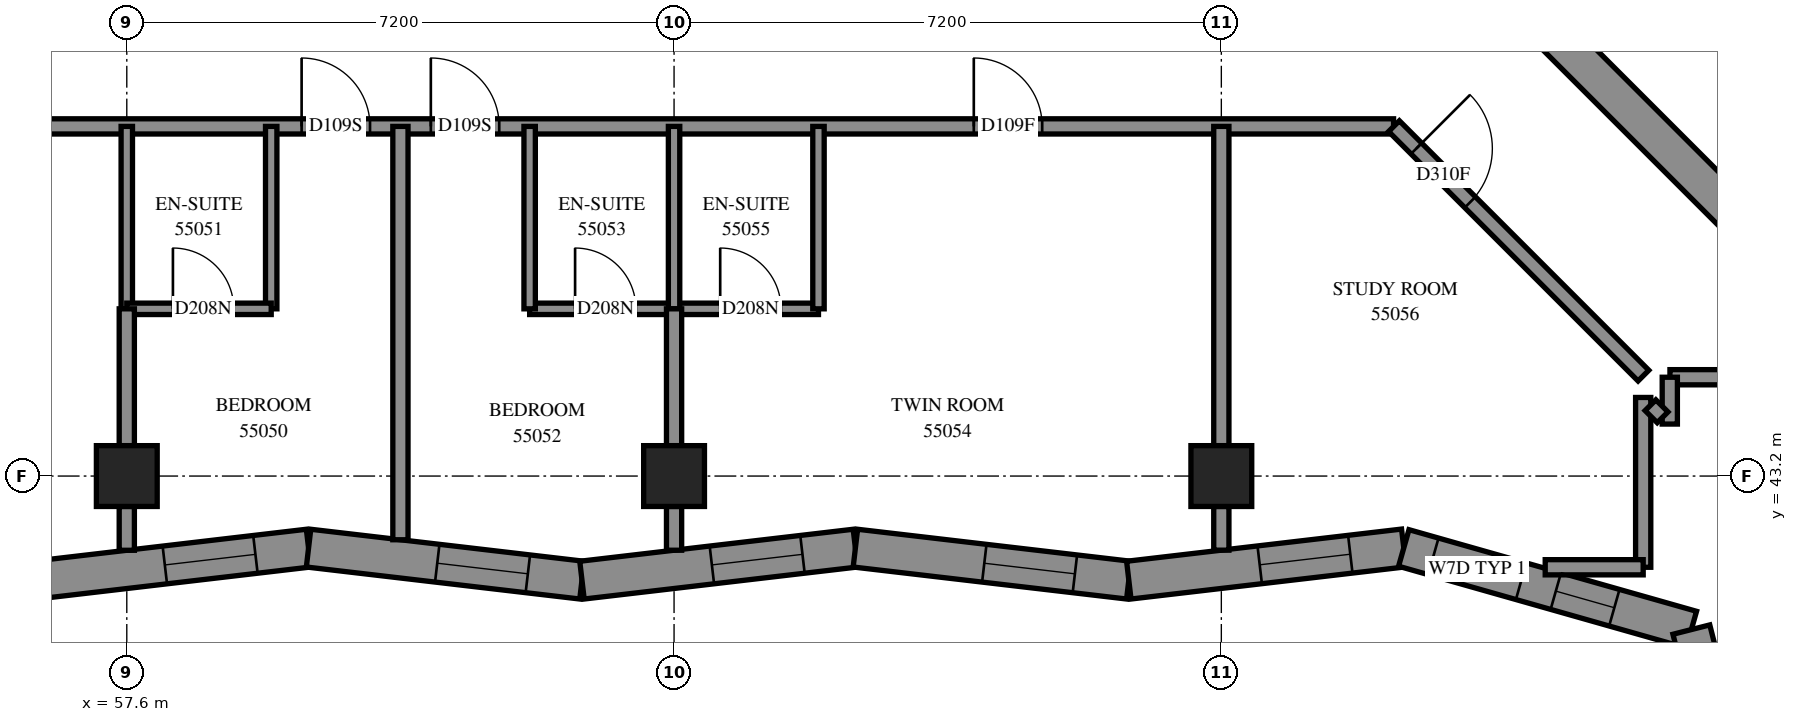
"""IFC4 building model, lengths in metres.
Left out: names, types, materials, properties, quantities, classifications, styles, units other than length and angle.
Written with IfcOpenShell. Run it as: python <this file> out.ifc"""

import sys

from ifc_helpers import new_model, si_unit, direction, frame, frame_2d, origin, origin_2d, place, context, subcontext, project, spatial, polyline, rectangle, outline, extrude, element, fill, save


model = new_model("IFC4")
c1 = context("Model", 3, precision=1e-05, world=origin(), true_north=direction((0.0, 1.0)))
c2 = subcontext(c1, "Body", "Model", "MODEL_VIEW")
j1 = project(units=[si_unit("LENGTHUNIT", "METRE"), si_unit("PLANEANGLEUNIT", "RADIAN")], contexts=[c1])
p1 = place(None, origin())
s1 = spatial("IfcSite", under=j1, at=p1, CompositionType="ELEMENT")
p2 = place(p1, origin())
s2 = spatial("IfcBuilding", under=s1, at=p2, CompositionType="ELEMENT")
p3 = place(p2, frame((0.0, 0.0, 203.2)))
s3 = spatial("IfcBuildingStorey", under=s2, at=p3, CompositionType="ELEMENT", Elevation=203.2)
for number, where, z_axis, x_axis in (
    (1, (57.6, 43.2, 0.0), (0.0, 0.0, 1.0), (1.0, 0.0, 0.0)),
    (2, (64.8, 43.2, 0.0), (0.0, 0.0, 1.0), (1.0, 0.0, 0.0)),
    (3, (72.0, 43.2, 0.0), (0.0, 0.0, 1.0), (1.0, 0.0, 0.0)),
):
    element("IfcColumn", number, at=place(p3, frame(where, z_axis=z_axis, x_axis=x_axis)), inside=s3, PredefinedType="COLUMN", context=c2, shape_type="SweptSolid", body=[
        extrude(rectangle(XDim=0.8, YDim=0.8, at=origin_2d()), origin(), (0.0, 0.0, 1.0), 3.1),
    ])
p4 = place(p3, frame((76.124, 49.267, -0.3), z_axis=(0.0, 0.0, 1.0), x_axis=(0.7071067812, -0.7071067812, 0.0)))
e4 = element("IfcWall", 4, at=p4, inside=s3, PredefinedType="SHEAR", context=c2, shape_type="SweptSolid", body=[
    extrude(rectangle(XDim=15.4, YDim=0.5, at=frame_2d((7.7, 0.0))), origin(), (0.0, 0.0, 1.0), 2.7),
])
p5 = place(p3, frame((56.394, 41.831, 0.0), z_axis=(0.0, 0.0, 1.0), x_axis=(0.9932205385, 0.1162452661, 0.0)))
e5 = element("IfcWall", 5, at=p5, inside=s3, PredefinedType="SOLIDWALL", context=c2, shape_type="SweptSolid", body=[
    extrude(outline(polyline([(-0.029, -0.25), (3.592, -0.25), (3.651, 0.25), (0.029, 0.25), (-0.029, -0.25)])), origin(), (0.0, 0.0, 1.0), 3.1),
])
p6 = place(p5, frame((1.718, 0.0, 0.45)))
e6 = element("IfcOpeningElement", 6, at=p6, cuts=e5, PredefinedType="OPENING", context=c2, shape_type="SweptSolid", body=[
    extrude(rectangle(XDim=1.2, YDim=2.5, at=frame_2d((0.6, 1.25))), frame((0.0, 0.26, 0.0), z_axis=(0.0, -1.0, 0.0), x_axis=(1.0, 0.0, 0.0)), (0.0, 0.0, 1.0), 0.52),
])
p7 = place(p3, frame((59.991, 42.252, 0.0), z_axis=(0.0, 0.0, 1.0), x_axis=(0.9932209116, -0.1162420782, 0.0)))
e7 = element("IfcWall", 7, at=p7, inside=s3, PredefinedType="SOLIDWALL", context=c2, shape_type="SweptSolid", body=[
    extrude(outline(polyline([(0.029, -0.25), (3.651, -0.25), (3.592, 0.25), (-0.029, 0.25), (0.029, -0.25)])), origin(), (0.0, 0.0, 1.0), 3.1),
])
p8 = place(p7, frame((1.705, 0.0, 0.45)))
e8 = element("IfcOpeningElement", 8, at=p8, cuts=e7, PredefinedType="OPENING", context=c2, shape_type="SweptSolid", body=[
    extrude(rectangle(XDim=1.2, YDim=2.5, at=frame_2d((0.6, 1.25))), frame((0.0, 0.26, 0.0), z_axis=(0.0, -1.0, 0.0), x_axis=(1.0, 0.0, 0.0)), (0.0, 0.0, 1.0), 0.52),
])
p9 = place(p3, frame((63.589, 41.831, 0.0), z_axis=(0.0, 0.0, 1.0), x_axis=(0.9932205385, 0.1162452661, 0.0)))
e9 = element("IfcWall", 9, at=p9, inside=s3, PredefinedType="SOLIDWALL", context=c2, shape_type="SweptSolid", body=[
    extrude(outline(polyline([(-0.029, -0.25), (3.592, -0.25), (3.651, 0.25), (0.029, 0.25), (-0.029, -0.25)])), origin(), (0.0, 0.0, 1.0), 3.1),
])
p10 = place(p9, frame((1.721, 0.0, 0.45)))
e10 = element("IfcOpeningElement", 10, at=p10, cuts=e9, PredefinedType="OPENING", context=c2, shape_type="SweptSolid", body=[
    extrude(rectangle(XDim=1.2, YDim=2.5, at=frame_2d((0.6, 1.25))), frame((0.0, 0.26, 0.0), z_axis=(0.0, -1.0, 0.0), x_axis=(1.0, 0.0, 0.0)), (0.0, 0.0, 1.0), 0.52),
])
p11 = place(p3, frame((67.186, 42.252, 0.0), z_axis=(0.0, 0.0, 1.0), x_axis=(0.9932205385, -0.1162452661, 0.0)))
e11 = element("IfcWall", 11, at=p11, inside=s3, PredefinedType="SOLIDWALL", context=c2, shape_type="SweptSolid", body=[
    extrude(outline(polyline([(0.029, -0.25), (3.651, -0.25), (3.592, 0.25), (-0.029, 0.25), (0.029, -0.25)])), origin(), (0.0, 0.0, 1.0), 3.1),
])
p12 = place(p11, frame((1.708, 0.0, 0.45)))
e12 = element("IfcOpeningElement", 12, at=p12, cuts=e11, PredefinedType="OPENING", context=c2, shape_type="SweptSolid", body=[
    extrude(rectangle(XDim=1.2, YDim=2.5, at=frame_2d((0.6, 1.25))), frame((0.0, 0.26, 0.0), z_axis=(0.0, -1.0, 0.0), x_axis=(1.0, 0.0, 0.0)), (0.0, 0.0, 1.0), 0.52),
])
p13 = place(p3, frame((70.783, 41.831, 0.0), z_axis=(0.0, 0.0, 1.0), x_axis=(0.9932201451, 0.1162486273, 0.0)))
e13 = element("IfcWall", 13, at=p13, inside=s3, PredefinedType="SOLIDWALL", context=c2, shape_type="SweptSolid", body=[
    extrude(outline(polyline([(-0.029, -0.25), (3.592, -0.25), (3.692, 0.25), (0.029, 0.25), (-0.029, -0.25)])), origin(), (0.0, 0.0, 1.0), 3.1),
])
p14 = place(p13, frame((1.734, 0.0, 0.45)))
e14 = element("IfcOpeningElement", 14, at=p14, cuts=e13, PredefinedType="OPENING", context=c2, shape_type="SweptSolid", body=[
    extrude(rectangle(XDim=1.2, YDim=2.5, at=frame_2d((0.6, 1.25))), frame((0.0, 0.26, 0.0), z_axis=(0.0, -1.0, 0.0), x_axis=(1.0, 0.0, 0.0)), (0.0, 0.0, 1.0), 0.52),
])
p15 = place(p3, frame((74.4, 42.254, 0.0), z_axis=(0.0, 0.0, 1.0), x_axis=(0.9620012555, -0.2730450228, 0.0)))
e15 = element("IfcWall", 15, at=p15, inside=s3, PredefinedType="SOLIDWALL", context=c2, shape_type="SweptSolid", body=[
    extrude(outline(polyline([(0.05, -0.25), (3.789, -0.25), (4.077, 0.25), (-0.05, 0.25), (0.05, -0.25)])), origin(), (0.0, 0.0, 1.0), 3.1),
])
p16 = place(p15, frame((0.405, 0.0, 0.5)))
e16 = element("IfcOpeningElement", 16, at=p16, cuts=e15, PredefinedType="OPENING", context=c2, shape_type="SweptSolid", body=[
    extrude(rectangle(XDim=1.2, YDim=2.45, at=frame_2d((0.6, 1.225))), frame((0.0, 0.26, 0.0), z_axis=(0.0, -1.0, 0.0), x_axis=(1.0, 0.0, 0.0)), (0.0, 0.0, 1.0), 0.52),
])
p17 = place(p15, frame((2.079, 0.0, 0.45)))
e17 = element("IfcOpeningElement", 17, at=p17, cuts=e15, PredefinedType="OPENING", context=c2, shape_type="SweptSolid", body=[
    extrude(rectangle(XDim=0.8, YDim=2.5, at=frame_2d((0.4, 1.25))), frame((0.0, 0.26, 0.0), z_axis=(0.0, -1.0, 0.0), x_axis=(1.0, 0.0, 0.0)), (0.0, 0.0, 1.0), 0.52),
])
p18 = place(p3, frame((78.184, 41.18, 0.0), z_axis=(0.0, 0.0, 1.0), x_axis=(0.2459826289, -0.9692742369, 0.0)))
e18 = element("IfcWall", 18, at=p18, inside=s3, PredefinedType="SOLIDWALL", context=c2, shape_type="SweptSolid", body=[
    extrude(outline(polyline([(0.144, -0.25), (4.837, -0.25), (4.552, 0.25), (-0.144, 0.25), (0.144, -0.25)])), origin(), (0.0, 0.0, 1.0), 3.1),
])
p19 = place(p18, frame((0.565, 0.0, 0.45)))
e19 = element("IfcOpeningElement", 19, at=p19, cuts=e18, PredefinedType="OPENING", context=c2, shape_type="SweptSolid", body=[
    extrude(rectangle(XDim=1.2, YDim=2.5, at=frame_2d((0.6, 1.25))), frame((0.0, 0.26, 0.0), z_axis=(0.0, -1.0, 0.0), x_axis=(1.0, 0.0, 0.0)), (0.0, 0.0, 1.0), 0.52),
])
p20 = place(p18, frame((2.391, 0.0, 0.45)))
e20 = element("IfcOpeningElement", 20, at=p20, cuts=e18, PredefinedType="OPENING", context=c2, shape_type="SweptSolid", body=[
    extrude(rectangle(XDim=1.2, YDim=2.5, at=frame_2d((0.6, 1.25))), frame((0.0, 0.26, 0.0), z_axis=(0.0, -1.0, 0.0), x_axis=(1.0, 0.0, 0.0)), (0.0, 0.0, 1.0), 0.52),
])
p21 = place(p3, frame((55.0, 47.8, 0.0), z_axis=(0.0, 0.0, 1.0), x_axis=(1.0, 0.0, 0.0)))
e21 = element("IfcWall", 21, at=p21, inside=s3, PredefinedType="PARTITIONING", context=c2, shape_type="SweptSolid", body=[
    extrude(rectangle(XDim=19.266, YDim=0.2, at=frame_2d((9.633, 0.0))), origin(), (0.0, 0.0, 1.0), 3.1),
])
p22 = place(p21, frame((4.9, 0.0, 0.0)))
e22 = element("IfcOpeningElement", 22, at=p22, cuts=e21, PredefinedType="OPENING", context=c2, shape_type="SweptSolid", body=[
    extrude(rectangle(XDim=0.9, YDim=2.1, at=frame_2d((0.45, 1.05))), frame((0.0, 0.11, 0.0), z_axis=(0.0, -1.0, 0.0), x_axis=(1.0, 0.0, 0.0)), (0.0, 0.0, 1.0), 0.22),
])
p23 = place(p21, frame((6.6, 0.0, 0.0)))
e23 = element("IfcOpeningElement", 23, at=p23, cuts=e21, PredefinedType="OPENING", context=c2, shape_type="SweptSolid", body=[
    extrude(rectangle(XDim=0.9, YDim=2.1, at=frame_2d((0.45, 1.05))), frame((0.0, 0.11, 0.0), z_axis=(0.0, -1.0, 0.0), x_axis=(1.0, 0.0, 0.0)), (0.0, 0.0, 1.0), 0.22),
])
p24 = place(p21, frame((13.743, 0.0, 0.0)))
e24 = element("IfcOpeningElement", 24, at=p24, cuts=e21, PredefinedType="OPENING", context=c2, shape_type="SweptSolid", body=[
    extrude(rectangle(XDim=0.9, YDim=2.1, at=frame_2d((0.45, 1.05))), frame((0.0, 0.11, 0.0), z_axis=(0.0, -1.0, 0.0), x_axis=(1.0, 0.0, 0.0)), (0.0, 0.0, 1.0), 0.22),
])
p25 = place(p3, frame((61.2, 42.362, 0.0), z_axis=(0.0, 0.0, 1.0), x_axis=(0.0, 1.0, 0.0)))
e25 = element("IfcWall", 25, at=p25, inside=s3, PredefinedType="PARTITIONING", context=c2, shape_type="SweptSolid", body=[
    extrude(rectangle(XDim=5.438, YDim=0.2, at=frame_2d((2.719, 0.0))), origin(), (0.0, 0.0, 1.0), 3.1),
])
p26 = place(p3, frame((74.272, 47.803, 0.0), z_axis=(0.0, 0.0, 1.0), x_axis=(0.7071067812, -0.7071067812, 0.0)))
e26 = element("IfcWall", 26, at=p26, inside=s3, PredefinedType="PARTITIONING", context=c2, shape_type="SweptSolid", body=[
    extrude(rectangle(XDim=4.641, YDim=0.2, at=frame_2d((2.321, 0.0))), origin(), (0.0, 0.0, 1.0), 3.1),
])
p27 = place(p26, frame((0.416, 0.0, 0.0)))
e27 = element("IfcOpeningElement", 27, at=p27, cuts=e26, PredefinedType="OPENING", context=c2, shape_type="SweptSolid", body=[
    extrude(rectangle(XDim=1.0, YDim=2.1, at=frame_2d((0.5, 1.05))), frame((0.0, 0.11, 0.0), z_axis=(0.0, -1.0, 0.0), x_axis=(1.0, 0.0, 0.0)), (0.0, 0.0, 1.0), 0.22),
])
p28 = place(p3, frame((72.0, 43.6, 0.0), z_axis=(0.0, 0.0, 1.0), x_axis=(0.0, 1.0, 0.0)))
e28 = element("IfcWall", 28, at=p28, inside=s3, PredefinedType="PARTITIONING", context=c2, shape_type="SweptSolid", body=[
    extrude(rectangle(XDim=4.2, YDim=0.2, at=frame_2d((2.1, 0.0))), origin(), (0.0, 0.0, 1.0), 3.1),
])
p29 = place(p3, frame((62.9, 45.4, 0.0), z_axis=(0.0, 0.0, 1.0), x_axis=(1.0, 0.0, 0.0)))
e29 = element("IfcWall", 29, at=p29, inside=s3, PredefinedType="PARTITIONING", context=c2, shape_type="SweptSolid", body=[
    extrude(rectangle(XDim=3.8, YDim=0.15, at=frame_2d((1.9, 0.0))), origin(), (0.0, 0.0, 1.0), 3.1),
])
p30 = place(p29, frame((0.598, 0.0, 0.0)))
e30 = element("IfcOpeningElement", 30, at=p30, cuts=e29, PredefinedType="OPENING", context=c2, shape_type="SweptSolid", body=[
    extrude(rectangle(XDim=0.8, YDim=2.1, at=frame_2d((0.4, 1.05))), frame((0.0, 0.085, 0.0), z_axis=(0.0, -1.0, 0.0), x_axis=(1.0, 0.0, 0.0)), (0.0, 0.0, 1.0), 0.17),
])
p31 = place(p29, frame((2.507, 0.0, 0.0)))
e31 = element("IfcOpeningElement", 31, at=p31, cuts=e29, PredefinedType="OPENING", context=c2, shape_type="SweptSolid", body=[
    extrude(rectangle(XDim=0.8, YDim=2.1, at=frame_2d((0.4, 1.05))), frame((0.0, 0.085, 0.0), z_axis=(0.0, -1.0, 0.0), x_axis=(1.0, 0.0, 0.0)), (0.0, 0.0, 1.0), 0.17),
])
p32 = place(p3, frame((77.902, 44.5, 0.0), z_axis=(0.0, 0.0, 1.0), x_axis=(1.0, 0.0, 0.0)))
e32 = element("IfcWall", 32, at=p32, inside=s3, PredefinedType="PARTITIONING", context=c2, shape_type="SweptSolid", body=[
    extrude(rectangle(XDim=2.522, YDim=0.2, at=frame_2d((1.261, 0.0))), origin(), (0.0, 0.0, 1.0), 3.1),
])
for number, where, z_axis, x_axis in (
    (33, (59.5, 45.4, 0.0), (0.0, 0.0, 1.0), (0.0, 1.0, 0.0)),
    (34, (57.6, 45.4, 0.0), (0.0, 0.0, 1.0), (0.0, 1.0, 0.0)),
    (35, (62.9, 45.4, 0.0), (0.0, 0.0, 1.0), (0.0, 1.0, 0.0)),
    (36, (66.7, 45.4, 0.0), (0.0, 0.0, 1.0), (0.0, 1.0, 0.0)),
    (37, (64.8, 45.4, 0.0), (0.0, 0.0, 1.0), (0.0, 1.0, 0.0)),
):
    element("IfcWall", number, at=place(p3, frame(where, z_axis=z_axis, x_axis=x_axis)), inside=s3, PredefinedType="PARTITIONING", context=c2, shape_type="SweptSolid", body=[
        extrude(rectangle(XDim=2.4, YDim=0.15, at=frame_2d((1.2, 0.0))), origin(), (0.0, 0.0, 1.0), 3.1),
    ])
p33 = place(p3, frame((77.55, 42.0, 0.0), z_axis=(0.0, 0.0, 1.0), x_axis=(0.0, 1.0, 0.0)))
e38 = element("IfcWall", 38, at=p33, inside=s3, PredefinedType="PARTITIONING", context=c2, shape_type="SweptSolid", body=[
    extrude(rectangle(XDim=2.234, YDim=0.2, at=frame_2d((1.117, 0.0))), origin(), (0.0, 0.0, 1.0), 3.1),
])
p34 = place(p3, frame((57.6, 45.4, 0.0), z_axis=(0.0, 0.0, 1.0), x_axis=(1.0, 0.0, 0.0)))
e39 = element("IfcWall", 39, at=p34, inside=s3, PredefinedType="PARTITIONING", context=c2, shape_type="SweptSolid", body=[
    extrude(rectangle(XDim=1.9, YDim=0.15, at=frame_2d((0.95, 0.0))), origin(), (0.0, 0.0, 1.0), 3.1),
])
p35 = place(p34, frame((0.607, 0.0, 0.0)))
e40 = element("IfcOpeningElement", 40, at=p35, cuts=e39, PredefinedType="OPENING", context=c2, shape_type="SweptSolid", body=[
    extrude(rectangle(XDim=0.8, YDim=2.1, at=frame_2d((0.4, 1.05))), frame((0.0, 0.085, 0.0), z_axis=(0.0, -1.0, 0.0), x_axis=(1.0, 0.0, 0.0)), (0.0, 0.0, 1.0), 0.17),
])
for number, where, z_axis, x_axis in (
    (41, (57.6, 43.6, 0.0), (0.0, 0.0, 1.0), (0.0, 1.0, 0.0)),
    (42, (64.8, 43.6, 0.0), (0.0, 0.0, 1.0), (0.0, 1.0, 0.0)),
):
    element("IfcWall", number, at=place(p3, frame(where, z_axis=z_axis, x_axis=x_axis)), inside=s3, PredefinedType="PARTITIONING", context=c2, shape_type="SweptSolid", body=[
        extrude(rectangle(XDim=1.8, YDim=0.2, at=frame_2d((0.9, 0.0))), origin(), (0.0, 0.0, 1.0), 3.1),
    ])
p36 = place(p3, frame((76.261, 42.0, 0.0), z_axis=(0.0, 0.0, 1.0), x_axis=(1.0, 0.0, 0.0)))
e43 = element("IfcWall", 43, at=p36, inside=s3, PredefinedType="PARTITIONING", context=c2, shape_type="SweptSolid", body=[
    extrude(rectangle(XDim=1.289, YDim=0.2, at=frame_2d((0.644, 0.0))), origin(), (0.0, 0.0, 1.0), 3.1),
])
p37 = place(p3, frame((78.533, 40.82, 0.0), z_axis=(0.0, 0.0, 1.0), x_axis=(0.7071067812, 0.7071067812, 0.0)))
e44 = element("IfcWall", 44, at=p37, inside=s3, PredefinedType="PARTITIONING", context=c2, shape_type="SweptSolid", body=[
    extrude(rectangle(XDim=1.032, YDim=0.2, at=frame_2d((0.516, 0.0))), origin(), (0.0, 0.0, 1.0), 3.1),
])
p38 = place(p3, frame((77.9, 43.884, 0.0), z_axis=(0.0, 0.0, 1.0), x_axis=(0.0, 1.0, 0.0)))
e45 = element("IfcWall", 45, at=p38, inside=s3, PredefinedType="PARTITIONING", context=c2, shape_type="SweptSolid", body=[
    extrude(rectangle(XDim=0.616, YDim=0.2, at=frame_2d((0.308, 0.0))), origin(), (0.0, 0.0, 1.0), 3.1),
])
p39 = place(p3, frame((57.6, 42.224, 0.0), z_axis=(0.0, 0.0, 1.0), x_axis=(0.0, 1.0, 0.0)))
e46 = element("IfcWall", 46, at=p39, inside=s3, PredefinedType="PARTITIONING", context=c2, shape_type="SweptSolid", body=[
    extrude(rectangle(XDim=0.577, YDim=0.2, at=frame_2d((0.288, 0.0))), origin(), (0.0, 0.0, 1.0), 3.1),
])
p40 = place(p3, frame((64.8, 42.224, 0.0), z_axis=(0.0, 0.0, 1.0), x_axis=(0.0, 1.0, 0.0)))
e47 = element("IfcWall", 47, at=p40, inside=s3, PredefinedType="PARTITIONING", context=c2, shape_type="SweptSolid", body=[
    extrude(rectangle(XDim=0.576, YDim=0.2, at=frame_2d((0.288, 0.0))), origin(), (0.0, 0.0, 1.0), 3.1),
])
p41 = place(p3, frame((72.0, 42.225, 0.0), z_axis=(0.0, 0.0, 1.0), x_axis=(0.0, 1.0, 0.0)))
e48 = element("IfcWall", 48, at=p41, inside=s3, PredefinedType="PARTITIONING", context=c2, shape_type="SweptSolid", body=[
    extrude(rectangle(XDim=0.575, YDim=0.2, at=frame_2d((0.287, 0.0))), origin(), (0.0, 0.0, 1.0), 3.1),
])
p42 = place(p3, frame((77.646, 44.132, 0.0), z_axis=(0.0, 0.0, 1.0), x_axis=(0.7068844555, -0.707329037, 0.0)))
e49 = element("IfcWall", 49, at=p42, inside=s3, PredefinedType="PARTITIONING", context=c2, shape_type="SweptSolid", body=[
    extrude(rectangle(XDim=0.225, YDim=0.2, at=frame_2d((0.112, 0.0))), origin(), (0.0, 0.0, 1.0), 3.1),
])
p43 = place(p6, origin())
e50 = element("IfcWindow", 50, at=p43, inside=s3, PartitioningType="SINGLE_PANEL", PredefinedType="WINDOW", context=c2, shape_type="SweptSolid", body=[
    extrude(rectangle(XDim=1.2, YDim=2.5, at=frame_2d((0.6, 1.25))), frame((0.0, 0.18, 0.0), z_axis=(0.0, -1.0, 0.0), x_axis=(1.0, 0.0, 0.0)), (0.0, 0.0, 1.0), 0.06),
])
fill(e6, e50)
p44 = place(p8, origin())
e51 = element("IfcWindow", 51, at=p44, inside=s3, PartitioningType="SINGLE_PANEL", PredefinedType="WINDOW", context=c2, shape_type="SweptSolid", body=[
    extrude(rectangle(XDim=1.2, YDim=2.5, at=frame_2d((0.6, 1.25))), frame((0.0, 0.18, 0.0), z_axis=(0.0, -1.0, 0.0), x_axis=(1.0, 0.0, 0.0)), (0.0, 0.0, 1.0), 0.06),
])
fill(e8, e51)
p45 = place(p10, origin())
e52 = element("IfcWindow", 52, at=p45, inside=s3, PartitioningType="SINGLE_PANEL", PredefinedType="WINDOW", context=c2, shape_type="SweptSolid", body=[
    extrude(rectangle(XDim=1.2, YDim=2.5, at=frame_2d((0.6, 1.25))), frame((0.0, 0.18, 0.0), z_axis=(0.0, -1.0, 0.0), x_axis=(1.0, 0.0, 0.0)), (0.0, 0.0, 1.0), 0.06),
])
fill(e10, e52)
p46 = place(p12, origin())
e53 = element("IfcWindow", 53, at=p46, inside=s3, PartitioningType="SINGLE_PANEL", PredefinedType="WINDOW", context=c2, shape_type="SweptSolid", body=[
    extrude(rectangle(XDim=1.2, YDim=2.5, at=frame_2d((0.6, 1.25))), frame((0.0, 0.18, 0.0), z_axis=(0.0, -1.0, 0.0), x_axis=(1.0, 0.0, 0.0)), (0.0, 0.0, 1.0), 0.06),
])
fill(e12, e53)
p47 = place(p14, origin())
e54 = element("IfcWindow", 54, at=p47, inside=s3, PartitioningType="SINGLE_PANEL", PredefinedType="WINDOW", context=c2, shape_type="SweptSolid", body=[
    extrude(rectangle(XDim=1.2, YDim=2.5, at=frame_2d((0.6, 1.25))), frame((0.0, 0.18, 0.0), z_axis=(0.0, -1.0, 0.0), x_axis=(1.0, 0.0, 0.0)), (0.0, 0.0, 1.0), 0.06),
])
fill(e14, e54)
p48 = place(p22, origin())
e55 = element("IfcDoor", 55, at=p48, inside=s3, OperationType="SINGLE_SWING_LEFT", PredefinedType="DOOR", context=c2, shape_type="SweptSolid", body=[
    extrude(rectangle(XDim=0.9, YDim=2.1, at=frame_2d((0.45, 1.05))), frame((0.0, 0.025, 0.0), z_axis=(0.0, -1.0, 0.0), x_axis=(1.0, 0.0, 0.0)), (0.0, 0.0, 1.0), 0.05),
])
fill(e22, e55)
p49 = place(p35, origin())
e56 = element("IfcDoor", 56, at=p49, inside=s3, OperationType="SINGLE_SWING_RIGHT", PredefinedType="DOOR", context=c2, shape_type="SweptSolid", body=[
    extrude(rectangle(XDim=0.8, YDim=2.1, at=frame_2d((0.4, 1.05))), frame((0.0, 0.025, 0.0), z_axis=(0.0, -1.0, 0.0), x_axis=(1.0, 0.0, 0.0)), (0.0, 0.0, 1.0), 0.05),
])
fill(e40, e56)
p50 = place(p23, origin())
e57 = element("IfcDoor", 57, at=p50, inside=s3, OperationType="SINGLE_SWING_RIGHT", PredefinedType="DOOR", context=c2, shape_type="SweptSolid", body=[
    extrude(rectangle(XDim=0.9, YDim=2.1, at=frame_2d((0.45, 1.05))), frame((0.0, 0.025, 0.0), z_axis=(0.0, -1.0, 0.0), x_axis=(1.0, 0.0, 0.0)), (0.0, 0.0, 1.0), 0.05),
])
fill(e23, e57)
p51 = place(p30, origin())
e58 = element("IfcDoor", 58, at=p51, inside=s3, OperationType="SINGLE_SWING_RIGHT", PredefinedType="DOOR", context=c2, shape_type="SweptSolid", body=[
    extrude(rectangle(XDim=0.8, YDim=2.1, at=frame_2d((0.4, 1.05))), frame((0.0, 0.025, 0.0), z_axis=(0.0, -1.0, 0.0), x_axis=(1.0, 0.0, 0.0)), (0.0, 0.0, 1.0), 0.05),
])
fill(e30, e58)
p52 = place(p24, origin())
e59 = element("IfcDoor", 59, at=p52, inside=s3, OperationType="SINGLE_SWING_LEFT", PredefinedType="DOOR", context=c2, shape_type="SweptSolid", body=[
    extrude(rectangle(XDim=0.9, YDim=2.1, at=frame_2d((0.45, 1.05))), frame((0.0, 0.025, 0.0), z_axis=(0.0, -1.0, 0.0), x_axis=(1.0, 0.0, 0.0)), (0.0, 0.0, 1.0), 0.05),
])
fill(e24, e59)
p53 = place(p31, origin())
e60 = element("IfcDoor", 60, at=p53, inside=s3, OperationType="SINGLE_SWING_RIGHT", PredefinedType="DOOR", context=c2, shape_type="SweptSolid", body=[
    extrude(rectangle(XDim=0.8, YDim=2.1, at=frame_2d((0.4, 1.05))), frame((0.0, 0.025, 0.0), z_axis=(0.0, -1.0, 0.0), x_axis=(1.0, 0.0, 0.0)), (0.0, 0.0, 1.0), 0.05),
])
fill(e31, e60)
p54 = place(p27, origin())
e61 = element("IfcDoor", 61, at=p54, inside=s3, OperationType="SINGLE_SWING_LEFT", PredefinedType="DOOR", context=c2, shape_type="SweptSolid", body=[
    extrude(rectangle(XDim=1.0, YDim=2.1, at=frame_2d((0.5, 1.05))), frame((0.0, 0.025, 0.0), z_axis=(0.0, -1.0, 0.0), x_axis=(1.0, 0.0, 0.0)), (0.0, 0.0, 1.0), 0.05),
])
fill(e27, e61)
p55 = place(p16, origin())
e62 = element("IfcWindow", 62, at=p55, inside=s3, PartitioningType="SINGLE_PANEL", PredefinedType="WINDOW", context=c2, shape_type="SweptSolid", body=[
    extrude(rectangle(XDim=1.2, YDim=2.45, at=frame_2d((0.6, 1.225))), frame((0.0, 0.18, 0.0), z_axis=(0.0, -1.0, 0.0), x_axis=(1.0, 0.0, 0.0)), (0.0, 0.0, 1.0), 0.06),
])
fill(e16, e62)
p56 = place(p17, origin())
e63 = element("IfcWindow", 63, at=p56, inside=s3, PartitioningType="SINGLE_PANEL", PredefinedType="WINDOW", context=c2, shape_type="SweptSolid", body=[
    extrude(rectangle(XDim=0.8, YDim=2.5, at=frame_2d((0.4, 1.25))), frame((0.0, 0.18, 0.0), z_axis=(0.0, -1.0, 0.0), x_axis=(1.0, 0.0, 0.0)), (0.0, 0.0, 1.0), 0.06),
])
fill(e17, e63)
save(model, sys.argv[1])
